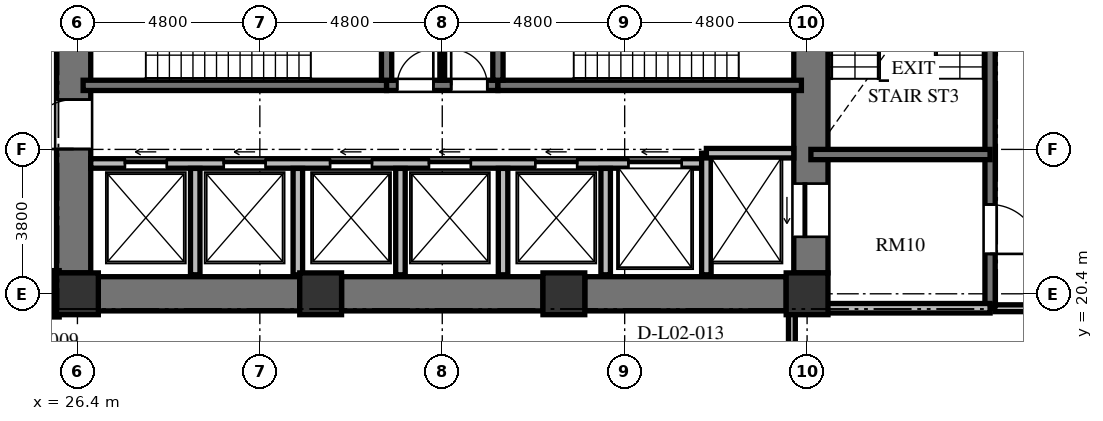
"""IFC4 building model, lengths in metres.
Left out: names, types, materials, properties, quantities, classifications, styles, units other than length and angle.
Written with IfcOpenShell. Run it as: python <this file> out.ifc"""

import sys

from ifc_helpers import new_model, si_unit, direction, frame, frame_2d, origin, origin_2d, place, context, subcontext, project, spatial, rectangle, extrude, element, fill, save


model = new_model("IFC4")
c1 = context("Model", 3, precision=1e-05, world=origin(), true_north=direction((0.0, 1.0)))
c2 = subcontext(c1, "Body", "Model", "MODEL_VIEW")
j1 = project(units=[si_unit("LENGTHUNIT", "METRE"), si_unit("PLANEANGLEUNIT", "RADIAN")], contexts=[c1])
p1 = place(None, origin())
s1 = spatial("IfcSite", under=j1, at=p1, CompositionType="ELEMENT")
p2 = place(p1, origin())
s2 = spatial("IfcBuilding", under=s1, at=p2, CompositionType="ELEMENT")
p3 = place(p2, frame((0.0, 0.0, 10.8)))
s3 = spatial("IfcBuildingStorey", under=s2, at=p3, CompositionType="ELEMENT", Elevation=10.8)
for number, where, z_axis, x_axis in (
    (1, (26.4, 20.4, 0.0), (0.0, 0.0, 1.0), (1.0, 0.0, 0.0)),
    (2, (32.8, 20.4, 0.0), (0.0, 0.0, 1.0), (1.0, 0.0, 0.0)),
    (3, (39.2, 20.4, 0.0), (0.0, 0.0, 1.0), (1.0, 0.0, 0.0)),
    (4, (45.6, 20.4, 0.0), (0.0, 0.0, 1.0), (1.0, 0.0, 0.0)),
):
    element("IfcColumn", number, at=place(p3, frame(where, z_axis=z_axis, x_axis=x_axis)), inside=s3, PredefinedType="COLUMN", context=c2, shape_type="SweptSolid", body=[
        extrude(rectangle(XDim=1.1, YDim=1.1, at=origin_2d()), origin(), (0.0, 0.0, 1.0), 4.8),
    ])
p4 = place(p3, frame((26.3, 20.95, 0.0), z_axis=(0.0, 0.0, 1.0), x_axis=(0.0, 1.0, 0.0)))
e5 = element("IfcWall", 5, at=p4, inside=s3, PredefinedType="SHEAR", context=c2, shape_type="SweptSolid", body=[
    extrude(rectangle(XDim=14.1, YDim=0.9, at=frame_2d((7.05, 0.0))), origin(), (0.0, 0.0, 1.0), 4.8),
])
p5 = place(p4, frame((6.5, 0.0, 0.0)))
e6 = element("IfcOpeningElement", 6, at=p5, cuts=e5, PredefinedType="OPENING", context=c2, shape_type="SweptSolid", body=[
    extrude(rectangle(XDim=1.2, YDim=2.15, at=frame_2d((0.6, 1.075))), frame((0.0, 0.46, 0.0), z_axis=(0.0, -1.0, 0.0), x_axis=(1.0, 0.0, 0.0)), (0.0, 0.0, 1.0), 0.92),
])
p6 = place(p4, frame((9.6, 0.0, 0.0)))
e7 = element("IfcOpeningElement", 7, at=p6, cuts=e5, PredefinedType="OPENING", context=c2, shape_type="SweptSolid", body=[
    extrude(rectangle(XDim=1.3, YDim=2.2, at=frame_2d((0.65, 1.1))), frame((0.0, 0.46, 0.0), z_axis=(0.0, -1.0, 0.0), x_axis=(1.0, 0.0, 0.0)), (0.0, 0.0, 1.0), 0.92),
])
p7 = place(p4, frame((3.26, 0.0, 0.0)))
e8 = element("IfcOpeningElement", 8, at=p7, cuts=e5, PredefinedType="OPENING", context=c2, shape_type="SweptSolid", body=[
    extrude(rectangle(XDim=1.3, YDim=2.2, at=frame_2d((0.65, 1.1))), frame((0.0, 0.46, 0.0), z_axis=(0.0, -1.0, 0.0), x_axis=(1.0, 0.0, 0.0)), (0.0, 0.0, 1.0), 0.92),
])
p8 = place(p3, frame((45.7, 20.95, 0.0), z_axis=(0.0, 0.0, 1.0), x_axis=(0.0, 1.0, 0.0)))
e9 = element("IfcWall", 9, at=p8, inside=s3, PredefinedType="SHEAR", context=c2, shape_type="SweptSolid", body=[
    extrude(rectangle(XDim=14.1, YDim=0.9, at=frame_2d((7.05, 0.0))), origin(), (0.0, 0.0, 1.0), 4.8),
])
p9 = place(p8, frame((11.75, 0.0, 0.0)))
e10 = element("IfcOpeningElement", 10, at=p9, cuts=e9, PredefinedType="OPENING", context=c2, shape_type="SweptSolid", body=[
    extrude(rectangle(XDim=1.4, YDim=2.3, at=frame_2d((0.7, 1.15))), frame((0.0, 0.46, 0.0), z_axis=(0.0, -1.0, 0.0), x_axis=(1.0, 0.0, 0.0)), (0.0, 0.0, 1.0), 0.92),
])
p10 = place(p8, frame((0.95, 0.0, 0.0)))
e11 = element("IfcOpeningElement", 11, at=p10, cuts=e9, PredefinedType="OPENING", context=c2, shape_type="SweptSolid", body=[
    extrude(rectangle(XDim=1.4, YDim=2.3, at=frame_2d((0.7, 1.15))), frame((0.0, 0.46, 0.0), z_axis=(0.0, -1.0, 0.0), x_axis=(1.0, 0.0, 0.0)), (0.0, 0.0, 1.0), 0.92),
])
p11 = place(p3, frame((26.95, 20.4, 0.0), z_axis=(0.0, 0.0, 1.0), x_axis=(1.0, 0.0, 0.0)))
e12 = element("IfcWall", 12, at=p11, inside=s3, PredefinedType="SHEAR", context=c2, shape_type="SweptSolid", body=[
    extrude(rectangle(XDim=5.3, YDim=0.9, at=frame_2d((2.65, 0.0))), origin(), (0.0, 0.0, 1.0), 4.8),
])
p12 = place(p3, frame((33.35, 20.4, 0.0), z_axis=(0.0, 0.0, 1.0), x_axis=(1.0, 0.0, 0.0)))
e13 = element("IfcWall", 13, at=p12, inside=s3, PredefinedType="SHEAR", context=c2, shape_type="SweptSolid", body=[
    extrude(rectangle(XDim=5.3, YDim=0.9, at=frame_2d((2.65, 0.0))), origin(), (0.0, 0.0, 1.0), 4.8),
])
p13 = place(p3, frame((39.75, 20.4, 0.0), z_axis=(0.0, 0.0, 1.0), x_axis=(1.0, 0.0, 0.0)))
e14 = element("IfcWall", 14, at=p13, inside=s3, PredefinedType="SHEAR", context=c2, shape_type="SweptSolid", body=[
    extrude(rectangle(XDim=5.3, YDim=0.9, at=frame_2d((2.65, 0.0))), origin(), (0.0, 0.0, 1.0), 4.8),
])
p14 = place(p3, frame((26.55, 25.885, 0.0), z_axis=(0.0, 0.0, 1.0), x_axis=(1.0, 0.0, 0.0)))
e15 = element("IfcWall", 15, at=p14, inside=s3, PredefinedType="SHEAR", context=c2, shape_type="SweptSolid", body=[
    extrude(rectangle(XDim=7.985, YDim=0.27, at=frame_2d((3.992, 0.0))), origin(), (0.0, 0.0, 1.0), 4.8),
])
p15 = place(p3, frame((34.535, 25.885, 0.0), z_axis=(0.0, 0.0, 1.0), x_axis=(1.0, 0.0, 0.0)))
e16 = element("IfcWall", 16, at=p15, inside=s3, PredefinedType="SHEAR", context=c2, shape_type="SweptSolid", body=[
    extrude(rectangle(XDim=2.93, YDim=0.27, at=frame_2d((1.465, 0.0))), origin(), (0.0, 0.0, 1.0), 4.8),
])
p16 = place(p15, frame((0.28, 0.0, 0.0)))
e17 = element("IfcOpeningElement", 17, at=p16, cuts=e16, PredefinedType="OPENING", context=c2, shape_type="SweptSolid", body=[
    extrude(rectangle(XDim=0.95, YDim=2.1, at=frame_2d((0.475, 1.05))), frame((0.0, 0.145, 0.0), z_axis=(0.0, -1.0, 0.0), x_axis=(1.0, 0.0, 0.0)), (0.0, 0.0, 1.0), 0.29),
])
p17 = place(p15, frame((1.7, 0.0, 0.0)))
e18 = element("IfcOpeningElement", 18, at=p17, cuts=e16, PredefinedType="OPENING", context=c2, shape_type="SweptSolid", body=[
    extrude(rectangle(XDim=0.95, YDim=2.1, at=frame_2d((0.475, 1.05))), frame((0.0, 0.145, 0.0), z_axis=(0.0, -1.0, 0.0), x_axis=(1.0, 0.0, 0.0)), (0.0, 0.0, 1.0), 0.29),
])
p18 = place(p3, frame((37.465, 25.885, 0.0), z_axis=(0.0, 0.0, 1.0), x_axis=(1.0, 0.0, 0.0)))
e19 = element("IfcWall", 19, at=p18, inside=s3, PredefinedType="SHEAR", context=c2, shape_type="SweptSolid", body=[
    extrude(rectangle(XDim=7.985, YDim=0.27, at=frame_2d((3.992, 0.0))), origin(), (0.0, 0.0, 1.0), 4.8),
])
for number, where, z_axis, x_axis in (
    (20, (34.535, 26.02, 0.0), (0.0, 0.0, 1.0), (0.0, 1.0, 0.0)),
    (21, (37.465, 26.02, 0.0), (0.0, 0.0, 1.0), (0.0, 1.0, 0.0)),
):
    element("IfcWall", number, at=place(p3, frame(where, z_axis=z_axis, x_axis=x_axis)), inside=s3, PredefinedType="SHEAR", context=c2, shape_type="SweptSolid", body=[
        extrude(rectangle(XDim=4.08, YDim=0.27, at=frame_2d((2.04, 0.0))), origin(), (0.0, 0.0, 1.0), 4.8),
    ])
p19 = place(p3, frame((36.0, 26.02, 0.0), z_axis=(0.0, 0.0, 1.0), x_axis=(0.0, 1.0, 0.0)))
e22 = element("IfcWall", 22, at=p19, inside=s3, PredefinedType="PARTITIONING", context=c2, shape_type="SweptSolid", body=[
    extrude(rectangle(XDim=4.08, YDim=0.125, at=frame_2d((2.04, 0.0))), origin(), (0.0, 0.0, 1.0), 4.52),
])
p20 = place(p3, frame((26.75, 23.83, 0.0), z_axis=(0.0, 0.0, 1.0), x_axis=(1.0, 0.0, 0.0)))
e23 = element("IfcWall", 23, at=p20, inside=s3, PredefinedType="SOLIDWALL", context=c2, shape_type="SweptSolid", body=[
    extrude(rectangle(XDim=16.2, YDim=0.25, at=frame_2d((8.1, 0.0))), origin(), (0.0, 0.0, 1.0), 4.52),
])
p21 = place(p20, frame((0.9, 0.0, 0.0)))
e24 = element("IfcOpeningElement", 24, at=p21, cuts=e23, PredefinedType="OPENING", context=c2, shape_type="SweptSolid", body=[
    extrude(rectangle(XDim=1.1, YDim=2.2, at=frame_2d((0.55, 1.1))), frame((0.0, 0.135, 0.0), z_axis=(0.0, -1.0, 0.0), x_axis=(1.0, 0.0, 0.0)), (0.0, 0.0, 1.0), 0.27),
])
p22 = place(p20, frame((3.5, 0.0, 0.0)))
e25 = element("IfcOpeningElement", 25, at=p22, cuts=e23, PredefinedType="OPENING", context=c2, shape_type="SweptSolid", body=[
    extrude(rectangle(XDim=1.1, YDim=2.2, at=frame_2d((0.55, 1.1))), frame((0.0, 0.135, 0.0), z_axis=(0.0, -1.0, 0.0), x_axis=(1.0, 0.0, 0.0)), (0.0, 0.0, 1.0), 0.27),
])
p23 = place(p20, frame((6.3, 0.0, 0.0)))
e26 = element("IfcOpeningElement", 26, at=p23, cuts=e23, PredefinedType="OPENING", context=c2, shape_type="SweptSolid", body=[
    extrude(rectangle(XDim=1.1, YDim=2.2, at=frame_2d((0.55, 1.1))), frame((0.0, 0.135, 0.0), z_axis=(0.0, -1.0, 0.0), x_axis=(1.0, 0.0, 0.0)), (0.0, 0.0, 1.0), 0.27),
])
p24 = place(p20, frame((8.9, 0.0, 0.0)))
e27 = element("IfcOpeningElement", 27, at=p24, cuts=e23, PredefinedType="OPENING", context=c2, shape_type="SweptSolid", body=[
    extrude(rectangle(XDim=1.1, YDim=2.2, at=frame_2d((0.55, 1.1))), frame((0.0, 0.135, 0.0), z_axis=(0.0, -1.0, 0.0), x_axis=(1.0, 0.0, 0.0)), (0.0, 0.0, 1.0), 0.27),
])
p25 = place(p20, frame((11.7, 0.0, 0.0)))
e28 = element("IfcOpeningElement", 28, at=p25, cuts=e23, PredefinedType="OPENING", context=c2, shape_type="SweptSolid", body=[
    extrude(rectangle(XDim=1.1, YDim=2.2, at=frame_2d((0.55, 1.1))), frame((0.0, 0.135, 0.0), z_axis=(0.0, -1.0, 0.0), x_axis=(1.0, 0.0, 0.0)), (0.0, 0.0, 1.0), 0.27),
])
p26 = place(p20, frame((14.15, 0.0, 0.0)))
e29 = element("IfcOpeningElement", 29, at=p26, cuts=e23, PredefinedType="OPENING", context=c2, shape_type="SweptSolid", body=[
    extrude(rectangle(XDim=1.4, YDim=2.3, at=frame_2d((0.7, 1.15))), frame((0.0, 0.135, 0.0), z_axis=(0.0, -1.0, 0.0), x_axis=(1.0, 0.0, 0.0)), (0.0, 0.0, 1.0), 0.27),
])
p27 = place(p3, frame((42.95, 20.9, 0.0), z_axis=(0.0, 0.0, 1.0), x_axis=(0.0, 1.0, 0.0)))
e30 = element("IfcWall", 30, at=p27, inside=s3, PredefinedType="SOLIDWALL", context=c2, shape_type="SweptSolid", body=[
    extrude(rectangle(XDim=3.2, YDim=0.25, at=frame_2d((1.6, 0.0))), origin(), (0.0, 0.0, 1.0), 4.52),
])
p28 = place(p3, frame((42.95, 24.1, 0.0), z_axis=(0.0, 0.0, 1.0), x_axis=(1.0, 0.0, 0.0)))
e31 = element("IfcWall", 31, at=p28, inside=s3, PredefinedType="SOLIDWALL", context=c2, shape_type="SweptSolid", body=[
    extrude(rectangle(XDim=2.3, YDim=0.25, at=frame_2d((1.15, 0.0))), origin(), (0.0, 0.0, 1.0), 4.52),
])
for number, where, z_axis, x_axis in (
    (32, (29.5, 20.9, 0.0), (0.0, 0.0, 1.0), (0.0, 1.0, 0.0)),
    (33, (32.2, 20.9, 0.0), (0.0, 0.0, 1.0), (0.0, 1.0, 0.0)),
    (34, (34.9, 20.9, 0.0), (0.0, 0.0, 1.0), (0.0, 1.0, 0.0)),
    (35, (37.6, 20.9, 0.0), (0.0, 0.0, 1.0), (0.0, 1.0, 0.0)),
    (36, (40.3, 20.9, 0.0), (0.0, 0.0, 1.0), (0.0, 1.0, 0.0)),
):
    element("IfcWall", number, at=place(p3, frame(where, z_axis=z_axis, x_axis=x_axis)), inside=s3, PredefinedType="SOLIDWALL", context=c2, shape_type="SweptSolid", body=[
        extrude(rectangle(XDim=2.8, YDim=0.25, at=frame_2d((1.4, 0.0))), origin(), (0.0, 0.0, 1.0), 4.52),
    ])
p29 = place(p3, frame((50.415, 35.845, 0.0), z_axis=(0.0, 0.0, 1.0), x_axis=(0.0, -1.0, 0.0)))
e37 = element("IfcWall", 37, at=p29, inside=s3, PredefinedType="SHEAR", context=c2, shape_type="SweptSolid", body=[
    extrude(rectangle(XDim=15.825, YDim=0.27, at=frame_2d((7.913, 0.0))), origin(), (0.0, 0.0, 1.0), 4.8),
])
p30 = place(p29, frame((4.445, 0.0, 0.0)))
e38 = element("IfcOpeningElement", 38, at=p30, cuts=e37, PredefinedType="OPENING", context=c2, shape_type="SweptSolid", body=[
    extrude(rectangle(XDim=1.2, YDim=2.15, at=frame_2d((0.6, 1.075))), frame((0.0, 0.145, 0.0), z_axis=(0.0, -1.0, 0.0), x_axis=(1.0, 0.0, 0.0)), (0.0, 0.0, 1.0), 0.29),
])
p31 = place(p29, frame((1.295, 0.0, 0.0)))
e39 = element("IfcOpeningElement", 39, at=p31, cuts=e37, PredefinedType="OPENING", context=c2, shape_type="SweptSolid", body=[
    extrude(rectangle(XDim=1.3, YDim=2.2, at=frame_2d((0.65, 1.1))), frame((0.0, 0.145, 0.0), z_axis=(0.0, -1.0, 0.0), x_axis=(1.0, 0.0, 0.0)), (0.0, 0.0, 1.0), 0.29),
])
p32 = place(p29, frame((13.095, 0.0, 0.0)))
e40 = element("IfcOpeningElement", 40, at=p32, cuts=e37, PredefinedType="OPENING", context=c2, shape_type="SweptSolid", body=[
    extrude(rectangle(XDim=1.3, YDim=2.2, at=frame_2d((0.65, 1.1))), frame((0.0, 0.145, 0.0), z_axis=(0.0, -1.0, 0.0), x_axis=(1.0, 0.0, 0.0)), (0.0, 0.0, 1.0), 0.29),
])
p33 = place(p3, frame((45.7, 24.065, 0.0), z_axis=(0.0, 0.0, 1.0), x_axis=(1.0, 0.0, 0.0)))
e41 = element("IfcWall", 41, at=p33, inside=s3, PredefinedType="SHEAR", context=c2, shape_type="SweptSolid", body=[
    extrude(rectangle(XDim=4.715, YDim=0.27, at=frame_2d((2.357, 0.0))), origin(), (0.0, 0.0, 1.0), 4.8),
])
p34 = place(p3, frame((45.7, 20.02, 0.0), z_axis=(0.0, 0.0, 1.0), x_axis=(1.0, 0.0, 0.0)))
e42 = element("IfcWall", 42, at=p34, inside=s3, PredefinedType="SOLIDWALL", context=c2, shape_type="SweptSolid", body=[
    extrude(rectangle(XDim=4.715, YDim=0.25, at=frame_2d((2.357, 0.0))), origin(), (0.0, 0.0, 1.0), 4.52),
])
p35 = place(p3, frame((53.19, 20.02, 0.0), z_axis=(0.0, 0.0, 1.0), x_axis=(-1.0, 0.0, 0.0)))
e43 = element("IfcWall", 43, at=p35, inside=s3, PredefinedType="PARTITIONING", context=c2, shape_type="SweptSolid", body=[
    extrude(rectangle(XDim=2.65, YDim=0.18, at=frame_2d((1.325, 0.0))), origin(), (0.0, 0.0, 1.0), 4.52),
])
p36 = place(p3, frame((25.83, 21.01, 0.0), z_axis=(0.0, 0.0, 1.0), x_axis=(0.0, -1.0, 0.0)))
e44 = element("IfcWall", 44, at=p36, inside=s3, PredefinedType="PARTITIONING", context=c2, shape_type="SweptSolid", body=[
    extrude(rectangle(XDim=1.22, YDim=0.18, at=frame_2d((0.61, 0.0))), origin(), (0.0, 0.0, 1.0), 4.52),
])
p37 = place(p3, frame((45.2, 19.91, 0.0), z_axis=(0.0, 0.0, 1.0), x_axis=(0.0, -1.0, 0.0)))
e45 = element("IfcWall", 45, at=p37, inside=s3, PredefinedType="PARTITIONING", context=c2, shape_type="SweptSolid", body=[
    extrude(rectangle(XDim=2.55, YDim=0.18, at=frame_2d((1.275, 0.0))), origin(), (0.0, 0.0, 1.0), 4.52),
])
p38 = place(p16, origin())
e46 = element("IfcDoor", 46, at=p38, inside=s3, OperationType="SINGLE_SWING_RIGHT", PredefinedType="DOOR", context=c2, shape_type="SweptSolid", body=[
    extrude(rectangle(XDim=0.95, YDim=2.1, at=frame_2d((0.475, 1.05))), frame((0.0, 0.025, 0.0), z_axis=(0.0, -1.0, 0.0), x_axis=(1.0, 0.0, 0.0)), (0.0, 0.0, 1.0), 0.05),
])
fill(e17, e46)
p39 = place(p17, origin())
e47 = element("IfcDoor", 47, at=p39, inside=s3, OperationType="SINGLE_SWING_LEFT", PredefinedType="DOOR", context=c2, shape_type="SweptSolid", body=[
    extrude(rectangle(XDim=0.95, YDim=2.1, at=frame_2d((0.475, 1.05))), frame((0.0, 0.025, 0.0), z_axis=(0.0, -1.0, 0.0), x_axis=(1.0, 0.0, 0.0)), (0.0, 0.0, 1.0), 0.05),
])
fill(e18, e47)
p40 = place(p7, origin())
e48 = element("IfcDoor", 48, at=p40, inside=s3, OperationType="SINGLE_SWING_LEFT", PredefinedType="DOOR", context=c2, shape_type="SweptSolid", body=[
    extrude(rectangle(XDim=1.3, YDim=2.2, at=frame_2d((0.65, 1.1))), frame((0.0, 0.025, 0.0), z_axis=(0.0, -1.0, 0.0), x_axis=(1.0, 0.0, 0.0)), (0.0, 0.0, 1.0), 0.05),
])
fill(e8, e48)
p41 = place(p21, origin())
e49 = element("IfcDoor", 49, at=p41, inside=s3, OperationType="SLIDING_TO_LEFT", PredefinedType="DOOR", context=c2, shape_type="SweptSolid", body=[
    extrude(rectangle(XDim=1.1, YDim=2.2, at=frame_2d((0.55, 1.1))), frame((0.0, 0.025, 0.0), z_axis=(0.0, -1.0, 0.0), x_axis=(1.0, 0.0, 0.0)), (0.0, 0.0, 1.0), 0.05),
])
fill(e24, e49)
p42 = place(p22, origin())
e50 = element("IfcDoor", 50, at=p42, inside=s3, OperationType="SLIDING_TO_LEFT", PredefinedType="DOOR", context=c2, shape_type="SweptSolid", body=[
    extrude(rectangle(XDim=1.1, YDim=2.2, at=frame_2d((0.55, 1.1))), frame((0.0, 0.025, 0.0), z_axis=(0.0, -1.0, 0.0), x_axis=(1.0, 0.0, 0.0)), (0.0, 0.0, 1.0), 0.05),
])
fill(e25, e50)
p43 = place(p23, origin())
e51 = element("IfcDoor", 51, at=p43, inside=s3, OperationType="SLIDING_TO_LEFT", PredefinedType="DOOR", context=c2, shape_type="SweptSolid", body=[
    extrude(rectangle(XDim=1.1, YDim=2.2, at=frame_2d((0.55, 1.1))), frame((0.0, 0.025, 0.0), z_axis=(0.0, -1.0, 0.0), x_axis=(1.0, 0.0, 0.0)), (0.0, 0.0, 1.0), 0.05),
])
fill(e26, e51)
p44 = place(p24, origin())
e52 = element("IfcDoor", 52, at=p44, inside=s3, OperationType="SLIDING_TO_LEFT", PredefinedType="DOOR", context=c2, shape_type="SweptSolid", body=[
    extrude(rectangle(XDim=1.1, YDim=2.2, at=frame_2d((0.55, 1.1))), frame((0.0, 0.025, 0.0), z_axis=(0.0, -1.0, 0.0), x_axis=(1.0, 0.0, 0.0)), (0.0, 0.0, 1.0), 0.05),
])
fill(e27, e52)
p45 = place(p25, origin())
e53 = element("IfcDoor", 53, at=p45, inside=s3, OperationType="SLIDING_TO_LEFT", PredefinedType="DOOR", context=c2, shape_type="SweptSolid", body=[
    extrude(rectangle(XDim=1.1, YDim=2.2, at=frame_2d((0.55, 1.1))), frame((0.0, 0.025, 0.0), z_axis=(0.0, -1.0, 0.0), x_axis=(1.0, 0.0, 0.0)), (0.0, 0.0, 1.0), 0.05),
])
fill(e28, e53)
p46 = place(p10, origin())
e54 = element("IfcDoor", 54, at=p46, inside=s3, OperationType="SLIDING_TO_LEFT", PredefinedType="DOOR", context=c2, shape_type="SweptSolid", body=[
    extrude(rectangle(XDim=1.4, YDim=2.3, at=frame_2d((0.7, 1.15))), frame((0.0, 0.025, 0.0), z_axis=(0.0, -1.0, 0.0), x_axis=(1.0, 0.0, 0.0)), (0.0, 0.0, 1.0), 0.05),
])
fill(e11, e54)
p47 = place(p26, origin())
e55 = element("IfcDoor", 55, at=p47, inside=s3, OperationType="SLIDING_TO_LEFT", PredefinedType="DOOR", context=c2, shape_type="SweptSolid", body=[
    extrude(rectangle(XDim=1.4, YDim=2.3, at=frame_2d((0.7, 1.15))), frame((0.0, 0.025, 0.0), z_axis=(0.0, -1.0, 0.0), x_axis=(1.0, 0.0, 0.0)), (0.0, 0.0, 1.0), 0.05),
])
fill(e29, e55)
p48 = place(p32, origin())
e56 = element("IfcDoor", 56, at=p48, inside=s3, OperationType="SINGLE_SWING_RIGHT", PredefinedType="DOOR", context=c2, shape_type="SweptSolid", body=[
    extrude(rectangle(XDim=1.3, YDim=2.2, at=frame_2d((0.65, 1.1))), frame((0.0, 0.025, 0.0), z_axis=(0.0, -1.0, 0.0), x_axis=(1.0, 0.0, 0.0)), (0.0, 0.0, 1.0), 0.05),
])
fill(e40, e56)
save(model, sys.argv[1])
